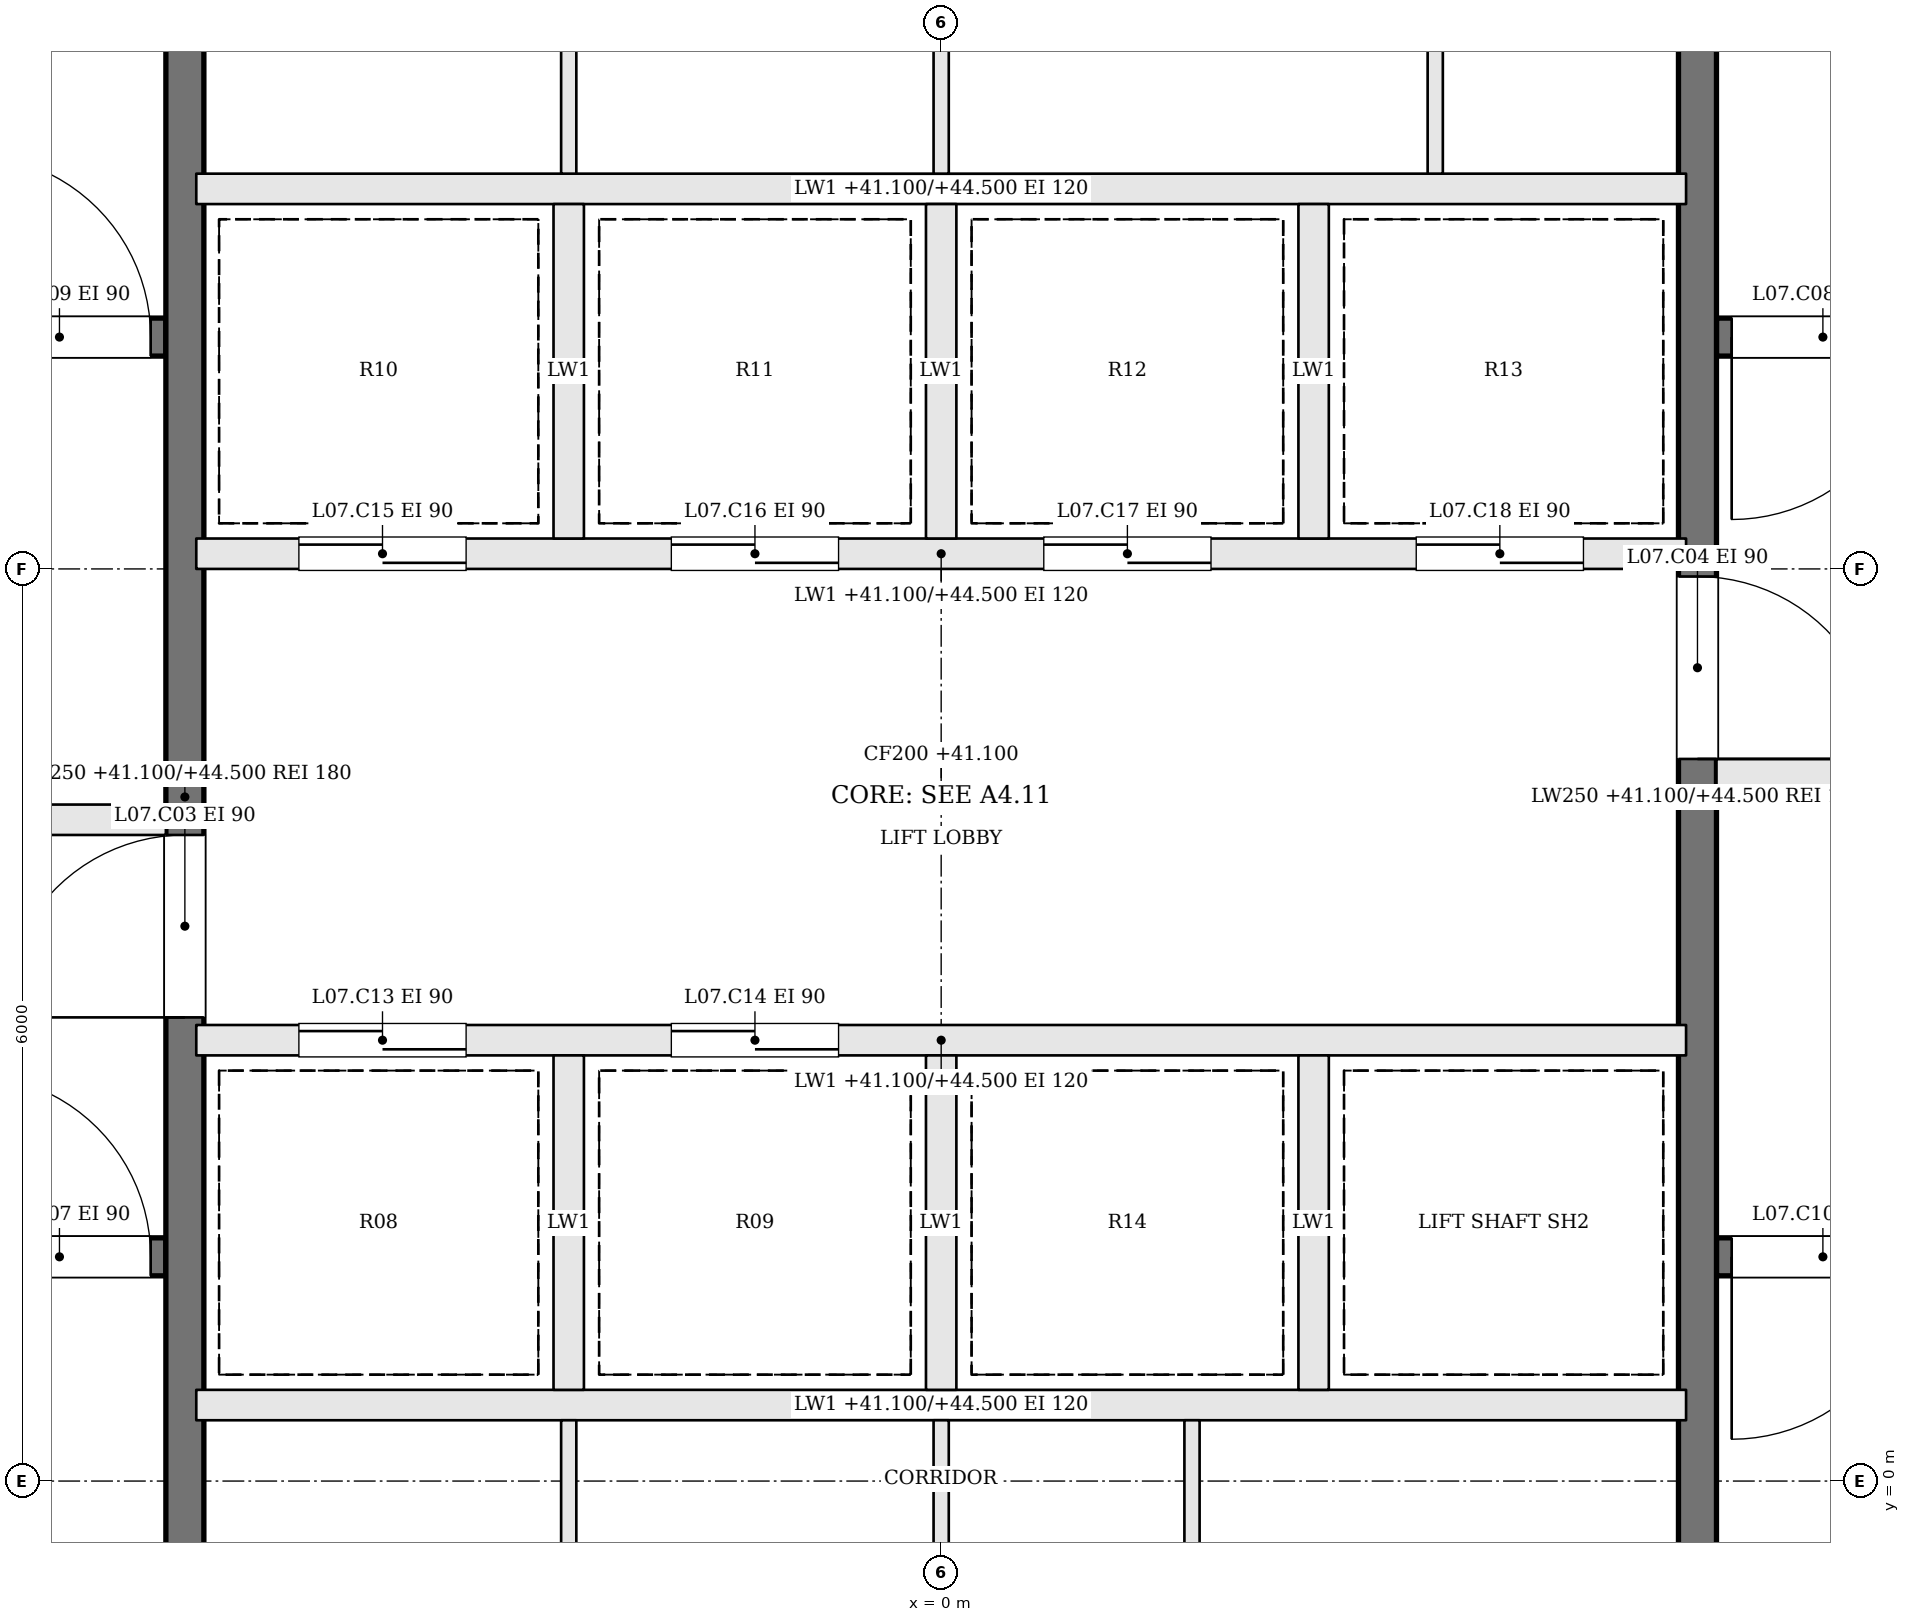
"""IFC4 building model, lengths in metres.
Left out: names, types, materials, properties, quantities, classifications, styles, units other than length and angle.
Written with IfcOpenShell. Run it as: python <this file> out.ifc"""

import sys

from ifc_helpers import new_model, si_unit, direction, frame, frame_2d, origin, place, context, subcontext, project, spatial, rectangle, extrude, element, fill, save


model = new_model("IFC4")
c1 = context("Model", 3, precision=1e-05, world=origin(), true_north=direction((0.0, 1.0)))
c2 = subcontext(c1, "Body", "Model", "MODEL_VIEW")
j1 = project(units=[si_unit("LENGTHUNIT", "METRE"), si_unit("PLANEANGLEUNIT", "RADIAN")], contexts=[c1])
p1 = place(None, origin())
s1 = spatial("IfcSite", under=j1, at=p1, CompositionType="ELEMENT")
p2 = place(p1, origin())
s2 = spatial("IfcBuilding", under=s1, at=p2, CompositionType="ELEMENT")
p3 = place(p2, frame((0.0, 0.0, 41.1)))
s3 = spatial("IfcBuildingStorey", under=s2, at=p3, CompositionType="ELEMENT", Elevation=41.1)
p4 = place(p3, frame((-11.6, 1.475, 0.0), z_axis=(0.0, 0.0, 1.0), x_axis=(1.0, 0.0, 0.0)))
e1 = element("IfcWall", 1, at=p4, inside=s3, PredefinedType="SOLIDWALL", context=c2, shape_type="SweptSolid", body=[
    extrude(rectangle(XDim=6.5, YDim=0.25, at=frame_2d((3.25, 0.0))), origin(), (0.0, 0.0, 1.0), 3.4),
])
p5 = place(p4, frame((5.2, 0.0, 0.0)))
e2 = element("IfcOpeningElement", 2, at=p5, cuts=e1, PredefinedType="OPENING", context=c2, shape_type="SweptSolid", body=[
    extrude(rectangle(XDim=1.2, YDim=2.1, at=frame_2d((0.6, 1.05))), frame((0.0, 0.135, 0.0), z_axis=(0.0, -1.0, 0.0), x_axis=(1.0, 0.0, 0.0)), (0.0, 0.0, 1.0), 0.27),
])
p6 = place(p3, frame((11.6, 7.525, 0.0), z_axis=(0.0, 0.0, 1.0), x_axis=(-1.0, 0.0, 0.0)))
e3 = element("IfcWall", 3, at=p6, inside=s3, PredefinedType="SOLIDWALL", context=c2, shape_type="SweptSolid", body=[
    extrude(rectangle(XDim=6.5, YDim=0.25, at=frame_2d((3.25, 0.0))), origin(), (0.0, 0.0, 1.0), 3.4),
])
p7 = place(p6, frame((5.2, 0.0, 0.0)))
e4 = element("IfcOpeningElement", 4, at=p7, cuts=e3, PredefinedType="OPENING", context=c2, shape_type="SweptSolid", body=[
    extrude(rectangle(XDim=1.2, YDim=2.1, at=frame_2d((0.6, 1.05))), frame((0.0, 0.135, 0.0), z_axis=(0.0, -1.0, 0.0), x_axis=(1.0, 0.0, 0.0)), (0.0, 0.0, 1.0), 0.27),
])
p8 = place(p3, frame((-11.6, 4.35, 0.0), z_axis=(0.0, 0.0, 1.0), x_axis=(1.0, 0.0, 0.0)))
e5 = element("IfcWall", 5, at=p8, inside=s3, PredefinedType="SOLIDWALL", context=c2, shape_type="SweptSolid", body=[
    extrude(rectangle(XDim=6.5, YDim=0.2, at=frame_2d((3.25, 0.0))), origin(), (0.0, 0.0, 1.0), 3.4),
])
p9 = place(p8, frame((3.8, 0.0, 0.0)))
e6 = element("IfcOpeningElement", 6, at=p9, cuts=e5, PredefinedType="OPENING", context=c2, shape_type="SweptSolid", body=[
    extrude(rectangle(XDim=1.2, YDim=2.1, at=frame_2d((0.6, 1.05))), frame((0.0, 0.11, 0.0), z_axis=(0.0, -1.0, 0.0), x_axis=(1.0, 0.0, 0.0)), (0.0, 0.0, 1.0), 0.22),
])
p10 = place(p8, frame((0.5, 0.0, 0.0)))
e7 = element("IfcOpeningElement", 7, at=p10, cuts=e5, PredefinedType="OPENING", context=c2, shape_type="SweptSolid", body=[
    extrude(rectangle(XDim=1.2, YDim=2.1, at=frame_2d((0.6, 1.05))), frame((0.0, 0.11, 0.0), z_axis=(0.0, -1.0, 0.0), x_axis=(1.0, 0.0, 0.0)), (0.0, 0.0, 1.0), 0.22),
])
p11 = place(p3, frame((11.6, 4.65, 0.0), z_axis=(0.0, 0.0, 1.0), x_axis=(-1.0, 0.0, 0.0)))
e8 = element("IfcWall", 8, at=p11, inside=s3, PredefinedType="SOLIDWALL", context=c2, shape_type="SweptSolid", body=[
    extrude(rectangle(XDim=6.5, YDim=0.2, at=frame_2d((3.25, 0.0))), origin(), (0.0, 0.0, 1.0), 3.4),
])
p12 = place(p11, frame((3.8, 0.0, 0.0)))
e9 = element("IfcOpeningElement", 9, at=p12, cuts=e8, PredefinedType="OPENING", context=c2, shape_type="SweptSolid", body=[
    extrude(rectangle(XDim=1.2, YDim=2.1, at=frame_2d((0.6, 1.05))), frame((0.0, 0.11, 0.0), z_axis=(0.0, -1.0, 0.0), x_axis=(1.0, 0.0, 0.0)), (0.0, 0.0, 1.0), 0.22),
])
p13 = place(p11, frame((0.5, 0.0, 0.0)))
e10 = element("IfcOpeningElement", 10, at=p13, cuts=e8, PredefinedType="OPENING", context=c2, shape_type="SweptSolid", body=[
    extrude(rectangle(XDim=1.2, YDim=2.1, at=frame_2d((0.6, 1.05))), frame((0.0, 0.11, 0.0), z_axis=(0.0, -1.0, 0.0), x_axis=(1.0, 0.0, 0.0)), (0.0, 0.0, 1.0), 0.22),
])
p14 = place(p3, frame((-11.6, 7.525, 0.0), z_axis=(0.0, 0.0, 1.0), x_axis=(1.0, 0.0, 0.0)))
e11 = element("IfcWall", 11, at=p14, inside=s3, PredefinedType="SOLIDWALL", context=c2, shape_type="SweptSolid", body=[
    extrude(rectangle(XDim=6.5, YDim=0.25, at=frame_2d((3.25, 0.0))), origin(), (0.0, 0.0, 1.0), 3.4),
])
p15 = place(p14, frame((5.2, 0.0, 0.0)))
e12 = element("IfcOpeningElement", 12, at=p15, cuts=e11, PredefinedType="OPENING", context=c2, shape_type="SweptSolid", body=[
    extrude(rectangle(XDim=1.2, YDim=2.1, at=frame_2d((0.6, 1.05))), frame((0.0, 0.135, 0.0), z_axis=(0.0, -1.0, 0.0), x_axis=(1.0, 0.0, 0.0)), (0.0, 0.0, 1.0), 0.27),
])
p16 = place(p3, frame((11.6, 1.475, 0.0), z_axis=(0.0, 0.0, 1.0), x_axis=(-1.0, 0.0, 0.0)))
e13 = element("IfcWall", 13, at=p16, inside=s3, PredefinedType="SOLIDWALL", context=c2, shape_type="SweptSolid", body=[
    extrude(rectangle(XDim=6.5, YDim=0.25, at=frame_2d((3.25, 0.0))), origin(), (0.0, 0.0, 1.0), 3.4),
])
p17 = place(p16, frame((5.2, 0.0, 0.0)))
e14 = element("IfcOpeningElement", 14, at=p17, cuts=e13, PredefinedType="OPENING", context=c2, shape_type="SweptSolid", body=[
    extrude(rectangle(XDim=1.2, YDim=2.1, at=frame_2d((0.6, 1.05))), frame((0.0, 0.135, 0.0), z_axis=(0.0, -1.0, 0.0), x_axis=(1.0, 0.0, 0.0)), (0.0, 0.0, 1.0), 0.27),
])
p18 = place(p3, frame((-4.975, -1.6, 0.0), z_axis=(0.0, 0.0, 1.0), x_axis=(0.0, 1.0, 0.0)))
e15 = element("IfcWall", 15, at=p18, inside=s3, PredefinedType="SOLIDWALL", context=c2, shape_type="SweptSolid", body=[
    extrude(rectangle(XDim=12.2, YDim=0.25, at=frame_2d((6.1, 0.0))), origin(), (0.0, 0.0, 1.0), 3.4),
])
p19 = place(p18, frame((4.65, 0.0, 0.0)))
e16 = element("IfcOpeningElement", 16, at=p19, cuts=e15, PredefinedType="OPENING", context=c2, shape_type="SweptSolid", body=[
    extrude(rectangle(XDim=1.2, YDim=2.1, at=frame_2d((0.6, 1.05))), frame((0.0, 0.135, 0.0), z_axis=(0.0, -1.0, 0.0), x_axis=(1.0, 0.0, 0.0)), (0.0, 0.0, 1.0), 0.27),
])
p20 = place(p3, frame((4.975, 10.6, 0.0), z_axis=(0.0, 0.0, 1.0), x_axis=(0.0, -1.0, 0.0)))
e17 = element("IfcWall", 17, at=p20, inside=s3, PredefinedType="SOLIDWALL", context=c2, shape_type="SweptSolid", body=[
    extrude(rectangle(XDim=12.2, YDim=0.25, at=frame_2d((6.1, 0.0))), origin(), (0.0, 0.0, 1.0), 3.4),
])
p21 = place(p20, frame((4.65, 0.0, 0.0)))
e18 = element("IfcOpeningElement", 18, at=p21, cuts=e17, PredefinedType="OPENING", context=c2, shape_type="SweptSolid", body=[
    extrude(rectangle(XDim=1.2, YDim=2.1, at=frame_2d((0.6, 1.05))), frame((0.0, 0.135, 0.0), z_axis=(0.0, -1.0, 0.0), x_axis=(1.0, 0.0, 0.0)), (0.0, 0.0, 1.0), 0.27),
])
p22 = place(p3, frame((-4.9, 0.5, 0.0), z_axis=(0.0, 0.0, 1.0), x_axis=(1.0, 0.0, 0.0)))
e19 = element("IfcWall", 19, at=p22, inside=s3, PredefinedType="SOLIDWALL", context=c2, shape_type="SweptSolid", body=[
    extrude(rectangle(XDim=9.8, YDim=0.2, at=frame_2d((4.9, 0.0))), origin(), (0.0, 0.0, 1.0), 3.4),
])
p23 = place(p3, frame((-4.9, 2.9, 0.0), z_axis=(0.0, 0.0, 1.0), x_axis=(1.0, 0.0, 0.0)))
e20 = element("IfcWall", 20, at=p23, inside=s3, PredefinedType="SOLIDWALL", context=c2, shape_type="SweptSolid", body=[
    extrude(rectangle(XDim=9.8, YDim=0.2, at=frame_2d((4.9, 0.0))), origin(), (0.0, 0.0, 1.0), 3.4),
])
p24 = place(p23, frame((0.675, 0.0, 0.0)))
e21 = element("IfcOpeningElement", 21, at=p24, cuts=e20, PredefinedType="OPENING", context=c2, shape_type="SweptSolid", body=[
    extrude(rectangle(XDim=1.1, YDim=2.1, at=frame_2d((0.55, 1.05))), frame((0.0, 0.11, 0.0), z_axis=(0.0, -1.0, 0.0), x_axis=(1.0, 0.0, 0.0)), (0.0, 0.0, 1.0), 0.22),
])
p25 = place(p23, frame((3.125, 0.0, 0.0)))
e22 = element("IfcOpeningElement", 22, at=p25, cuts=e20, PredefinedType="OPENING", context=c2, shape_type="SweptSolid", body=[
    extrude(rectangle(XDim=1.1, YDim=2.1, at=frame_2d((0.55, 1.05))), frame((0.0, 0.11, 0.0), z_axis=(0.0, -1.0, 0.0), x_axis=(1.0, 0.0, 0.0)), (0.0, 0.0, 1.0), 0.22),
])
p26 = place(p3, frame((-4.9, 6.1, 0.0), z_axis=(0.0, 0.0, 1.0), x_axis=(1.0, 0.0, 0.0)))
e23 = element("IfcWall", 23, at=p26, inside=s3, PredefinedType="SOLIDWALL", context=c2, shape_type="SweptSolid", body=[
    extrude(rectangle(XDim=9.8, YDim=0.2, at=frame_2d((4.9, 0.0))), origin(), (0.0, 0.0, 1.0), 3.4),
])
p27 = place(p26, frame((0.675, 0.0, 0.0)))
e24 = element("IfcOpeningElement", 24, at=p27, cuts=e23, PredefinedType="OPENING", context=c2, shape_type="SweptSolid", body=[
    extrude(rectangle(XDim=1.1, YDim=2.1, at=frame_2d((0.55, 1.05))), frame((0.0, 0.11, 0.0), z_axis=(0.0, -1.0, 0.0), x_axis=(1.0, 0.0, 0.0)), (0.0, 0.0, 1.0), 0.22),
])
p28 = place(p26, frame((3.125, 0.0, 0.0)))
e25 = element("IfcOpeningElement", 25, at=p28, cuts=e23, PredefinedType="OPENING", context=c2, shape_type="SweptSolid", body=[
    extrude(rectangle(XDim=1.1, YDim=2.1, at=frame_2d((0.55, 1.05))), frame((0.0, 0.11, 0.0), z_axis=(0.0, -1.0, 0.0), x_axis=(1.0, 0.0, 0.0)), (0.0, 0.0, 1.0), 0.22),
])
p29 = place(p26, frame((5.575, 0.0, 0.0)))
e26 = element("IfcOpeningElement", 26, at=p29, cuts=e23, PredefinedType="OPENING", context=c2, shape_type="SweptSolid", body=[
    extrude(rectangle(XDim=1.1, YDim=2.1, at=frame_2d((0.55, 1.05))), frame((0.0, 0.11, 0.0), z_axis=(0.0, -1.0, 0.0), x_axis=(1.0, 0.0, 0.0)), (0.0, 0.0, 1.0), 0.22),
])
p30 = place(p26, frame((8.025, 0.0, 0.0)))
e27 = element("IfcOpeningElement", 27, at=p30, cuts=e23, PredefinedType="OPENING", context=c2, shape_type="SweptSolid", body=[
    extrude(rectangle(XDim=1.1, YDim=2.1, at=frame_2d((0.55, 1.05))), frame((0.0, 0.11, 0.0), z_axis=(0.0, -1.0, 0.0), x_axis=(1.0, 0.0, 0.0)), (0.0, 0.0, 1.0), 0.22),
])
p31 = place(p3, frame((-4.9, 8.5, 0.0), z_axis=(0.0, 0.0, 1.0), x_axis=(1.0, 0.0, 0.0)))
e28 = element("IfcWall", 28, at=p31, inside=s3, PredefinedType="SOLIDWALL", context=c2, shape_type="SweptSolid", body=[
    extrude(rectangle(XDim=9.8, YDim=0.2, at=frame_2d((4.9, 0.0))), origin(), (0.0, 0.0, 1.0), 3.4),
])
for number, where, z_axis, x_axis in (
    (29, (-2.45, 0.6, 0.0), (0.0, 0.0, 1.0), (0.0, 1.0, 0.0)),
    (30, (0.0, 0.6, 0.0), (0.0, 0.0, 1.0), (0.0, 1.0, 0.0)),
    (31, (2.45, 0.6, 0.0), (0.0, 0.0, 1.0), (0.0, 1.0, 0.0)),
    (32, (-2.45, 6.2, 0.0), (0.0, 0.0, 1.0), (0.0, 1.0, 0.0)),
    (33, (0.0, 6.2, 0.0), (0.0, 0.0, 1.0), (0.0, 1.0, 0.0)),
    (34, (2.45, 6.2, 0.0), (0.0, 0.0, 1.0), (0.0, 1.0, 0.0)),
):
    element("IfcWall", number, at=place(p3, frame(where, z_axis=z_axis, x_axis=x_axis)), inside=s3, PredefinedType="SOLIDWALL", context=c2, shape_type="SweptSolid", body=[
        extrude(rectangle(XDim=2.2, YDim=0.2, at=frame_2d((1.1, 0.0))), origin(), (0.0, 0.0, 1.0), 3.4),
    ])
for number, where, z_axis, x_axis in (
    (35, (-2.45, -1.6, 0.0), (0.0, 0.0, 1.0), (0.0, 1.0, 0.0)),
    (36, (0.0, -1.6, 0.0), (0.0, 0.0, 1.0), (0.0, 1.0, 0.0)),
    (37, (1.65, -1.6, 0.0), (0.0, 0.0, 1.0), (0.0, 1.0, 0.0)),
    (38, (-2.45, 8.6, 0.0), (0.0, 0.0, 1.0), (0.0, 1.0, 0.0)),
    (39, (0.0, 8.6, 0.0), (0.0, 0.0, 1.0), (0.0, 1.0, 0.0)),
    (40, (3.25, 8.6, 0.0), (0.0, 0.0, 1.0), (0.0, 1.0, 0.0)),
):
    element("IfcWall", number, at=place(p3, frame(where, z_axis=z_axis, x_axis=x_axis)), inside=s3, PredefinedType="PARTITIONING", context=c2, shape_type="SweptSolid", body=[
        extrude(rectangle(XDim=2.0, YDim=0.1, at=frame_2d((1.0, 0.0))), origin(), (0.0, 0.0, 1.0), 3.4),
    ])
p32 = place(p19, origin())
e41 = element("IfcDoor", 41, at=p32, inside=s3, OperationType="SINGLE_SWING_LEFT", PredefinedType="DOOR", context=c2, shape_type="SweptSolid", body=[
    extrude(rectangle(XDim=1.2, YDim=2.1, at=frame_2d((0.6, 1.05))), frame((0.0, 0.025, 0.0), z_axis=(0.0, -1.0, 0.0), x_axis=(1.0, 0.0, 0.0)), (0.0, 0.0, 1.0), 0.05),
])
fill(e16, e41)
p33 = place(p21, origin())
e42 = element("IfcDoor", 42, at=p33, inside=s3, OperationType="SINGLE_SWING_RIGHT", PredefinedType="DOOR", context=c2, shape_type="SweptSolid", body=[
    extrude(rectangle(XDim=1.2, YDim=2.1, at=frame_2d((0.6, 1.05))), frame((0.0, 0.025, 0.0), z_axis=(0.0, -1.0, 0.0), x_axis=(1.0, 0.0, 0.0)), (0.0, 0.0, 1.0), 0.05),
])
fill(e18, e42)
p34 = place(p5, origin())
e43 = element("IfcDoor", 43, at=p34, inside=s3, OperationType="SINGLE_SWING_LEFT", PredefinedType="DOOR", context=c2, shape_type="SweptSolid", body=[
    extrude(rectangle(XDim=1.2, YDim=2.1, at=frame_2d((0.6, 1.05))), frame((0.0, 0.025, 0.0), z_axis=(0.0, -1.0, 0.0), x_axis=(1.0, 0.0, 0.0)), (0.0, 0.0, 1.0), 0.05),
])
fill(e2, e43)
p35 = place(p7, origin())
e44 = element("IfcDoor", 44, at=p35, inside=s3, OperationType="SINGLE_SWING_RIGHT", PredefinedType="DOOR", context=c2, shape_type="SweptSolid", body=[
    extrude(rectangle(XDim=1.2, YDim=2.1, at=frame_2d((0.6, 1.05))), frame((0.0, 0.025, 0.0), z_axis=(0.0, -1.0, 0.0), x_axis=(1.0, 0.0, 0.0)), (0.0, 0.0, 1.0), 0.05),
])
fill(e4, e44)
p36 = place(p15, origin())
e45 = element("IfcDoor", 45, at=p36, inside=s3, OperationType="SINGLE_SWING_LEFT", PredefinedType="DOOR", context=c2, shape_type="SweptSolid", body=[
    extrude(rectangle(XDim=1.2, YDim=2.1, at=frame_2d((0.6, 1.05))), frame((0.0, 0.025, 0.0), z_axis=(0.0, -1.0, 0.0), x_axis=(1.0, 0.0, 0.0)), (0.0, 0.0, 1.0), 0.05),
])
fill(e12, e45)
p37 = place(p17, origin())
e46 = element("IfcDoor", 46, at=p37, inside=s3, OperationType="SINGLE_SWING_RIGHT", PredefinedType="DOOR", context=c2, shape_type="SweptSolid", body=[
    extrude(rectangle(XDim=1.2, YDim=2.1, at=frame_2d((0.6, 1.05))), frame((0.0, 0.025, 0.0), z_axis=(0.0, -1.0, 0.0), x_axis=(1.0, 0.0, 0.0)), (0.0, 0.0, 1.0), 0.05),
])
fill(e14, e46)
p38 = place(p24, origin())
e47 = element("IfcDoor", 47, at=p38, inside=s3, OperationType="SLIDING_TO_RIGHT", PredefinedType="DOOR", context=c2, shape_type="SweptSolid", body=[
    extrude(rectangle(XDim=1.1, YDim=2.1, at=frame_2d((0.55, 1.05))), frame((0.0, 0.025, 0.0), z_axis=(0.0, -1.0, 0.0), x_axis=(1.0, 0.0, 0.0)), (0.0, 0.0, 1.0), 0.05),
])
fill(e21, e47)
p39 = place(p25, origin())
e48 = element("IfcDoor", 48, at=p39, inside=s3, OperationType="SLIDING_TO_LEFT", PredefinedType="DOOR", context=c2, shape_type="SweptSolid", body=[
    extrude(rectangle(XDim=1.1, YDim=2.1, at=frame_2d((0.55, 1.05))), frame((0.0, 0.025, 0.0), z_axis=(0.0, -1.0, 0.0), x_axis=(1.0, 0.0, 0.0)), (0.0, 0.0, 1.0), 0.05),
])
fill(e22, e48)
p40 = place(p27, origin())
e49 = element("IfcDoor", 49, at=p40, inside=s3, OperationType="SLIDING_TO_RIGHT", PredefinedType="DOOR", context=c2, shape_type="SweptSolid", body=[
    extrude(rectangle(XDim=1.1, YDim=2.1, at=frame_2d((0.55, 1.05))), frame((0.0, 0.025, 0.0), z_axis=(0.0, -1.0, 0.0), x_axis=(1.0, 0.0, 0.0)), (0.0, 0.0, 1.0), 0.05),
])
fill(e24, e49)
p41 = place(p28, origin())
e50 = element("IfcDoor", 50, at=p41, inside=s3, OperationType="SLIDING_TO_LEFT", PredefinedType="DOOR", context=c2, shape_type="SweptSolid", body=[
    extrude(rectangle(XDim=1.1, YDim=2.1, at=frame_2d((0.55, 1.05))), frame((0.0, 0.025, 0.0), z_axis=(0.0, -1.0, 0.0), x_axis=(1.0, 0.0, 0.0)), (0.0, 0.0, 1.0), 0.05),
])
fill(e25, e50)
p42 = place(p29, origin())
e51 = element("IfcDoor", 51, at=p42, inside=s3, OperationType="SLIDING_TO_RIGHT", PredefinedType="DOOR", context=c2, shape_type="SweptSolid", body=[
    extrude(rectangle(XDim=1.1, YDim=2.1, at=frame_2d((0.55, 1.05))), frame((0.0, 0.025, 0.0), z_axis=(0.0, -1.0, 0.0), x_axis=(1.0, 0.0, 0.0)), (0.0, 0.0, 1.0), 0.05),
])
fill(e26, e51)
p43 = place(p30, origin())
e52 = element("IfcDoor", 52, at=p43, inside=s3, OperationType="SLIDING_TO_LEFT", PredefinedType="DOOR", context=c2, shape_type="SweptSolid", body=[
    extrude(rectangle(XDim=1.1, YDim=2.1, at=frame_2d((0.55, 1.05))), frame((0.0, 0.025, 0.0), z_axis=(0.0, -1.0, 0.0), x_axis=(1.0, 0.0, 0.0)), (0.0, 0.0, 1.0), 0.05),
])
fill(e27, e52)
save(model, sys.argv[1])
